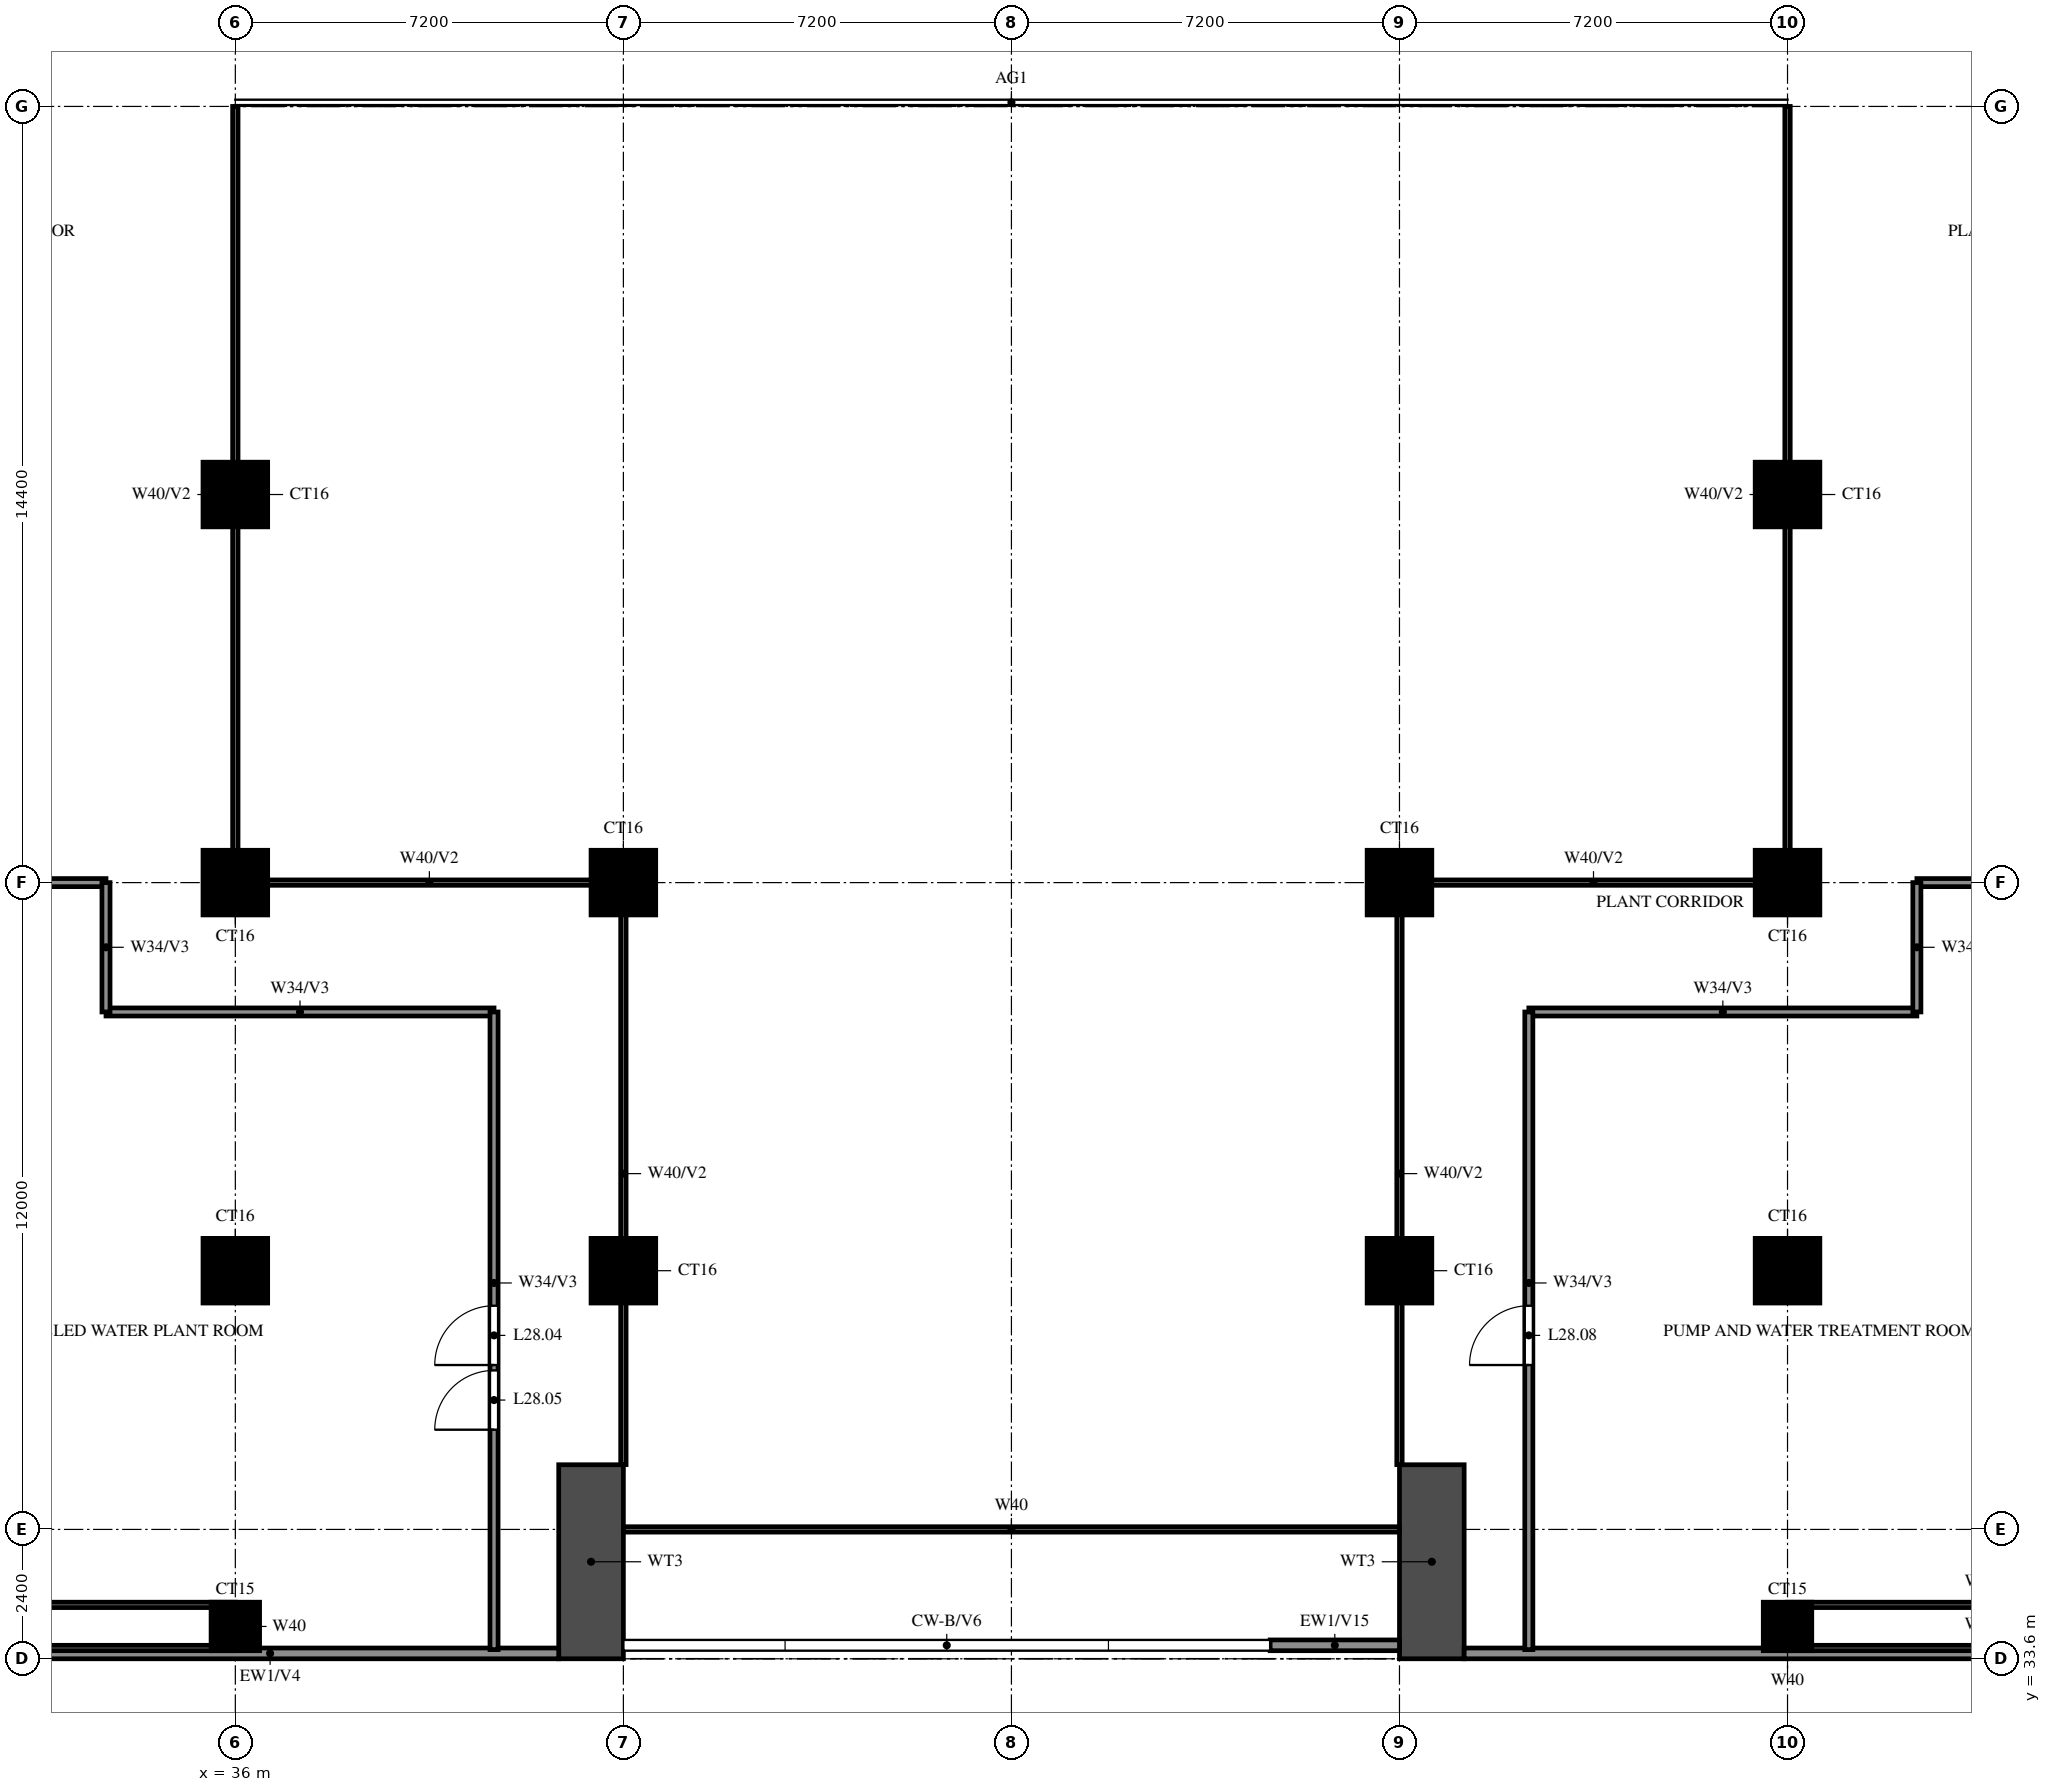
"""IFC4 building model, lengths in metres.
Left out: names, types, materials, properties, quantities, classifications, styles, units other than length and angle.
Written with IfcOpenShell. Run it as: python <this file> out.ifc"""

import sys

from ifc_helpers import new_model, si_unit, direction, frame, frame_2d, origin, origin_2d, place, context, subcontext, project, spatial, rectangle, extrude, source, transform, mapped, element, fill, save


model = new_model("IFC4")
c1 = context("Model", 3, precision=1e-05, world=origin(), true_north=direction((0.0, 1.0)))
c2 = subcontext(c1, "Body", "Model", "MODEL_VIEW")
j1 = project(units=[si_unit("LENGTHUNIT", "METRE"), si_unit("PLANEANGLEUNIT", "RADIAN")], contexts=[c1])
p1 = place(None, origin())
s1 = spatial("IfcSite", under=j1, at=p1, CompositionType="ELEMENT")
p2 = place(p1, origin())
s2 = spatial("IfcBuilding", under=s1, at=p2, CompositionType="ELEMENT")
p3 = place(p2, frame((0.0, 0.0, 107.5)))
s3 = spatial("IfcBuildingStorey", under=s2, at=p3, CompositionType="ELEMENT", Elevation=107.5)
m1 = source(origin(), c2, "Body", "SweptSolid", [
    extrude(rectangle(XDim=0.9, YDim=0.9, at=origin_2d()), origin(), (0.0, 0.0, 1.0), 5.2),
])
for number, where, z_axis, x_axis in (
    (1, (36.0, 34.2, 0.0), (0.0, 0.0, 1.0), (1.0, 0.0, 0.0)),
    (2, (64.8, 34.2, 0.0), (0.0, 0.0, 1.0), (1.0, 0.0, 0.0)),
):
    element("IfcColumn", number, at=place(p3, frame(where, z_axis=z_axis, x_axis=x_axis)), inside=s3, PredefinedType="COLUMN", context=c2, shape_type="MappedRepresentation", body=[
        mapped(m1, transform((0.0, 0.0, 0.0))),
    ])
m2 = source(origin(), c2, "Body", "SweptSolid", [
    extrude(rectangle(XDim=1.2, YDim=1.2, at=origin_2d()), origin(), (0.0, 0.0, 1.0), 5.2),
])
for number, where, z_axis, x_axis in (
    (3, (36.0, 40.8, 0.0), (0.0, 0.0, 1.0), (1.0, 0.0, 0.0)),
    (4, (43.2, 40.8, 0.0), (0.0, 0.0, 1.0), (1.0, 0.0, 0.0)),
    (5, (57.6, 40.8, 0.0), (0.0, 0.0, 1.0), (1.0, 0.0, 0.0)),
    (6, (64.8, 40.8, 0.0), (0.0, 0.0, 1.0), (1.0, 0.0, 0.0)),
    (7, (36.0, 48.0, 0.0), (0.0, 0.0, 1.0), (1.0, 0.0, 0.0)),
    (8, (43.2, 48.0, 0.0), (0.0, 0.0, 1.0), (1.0, 0.0, 0.0)),
    (9, (57.6, 48.0, 0.0), (0.0, 0.0, 1.0), (1.0, 0.0, 0.0)),
    (10, (64.8, 48.0, 0.0), (0.0, 0.0, 1.0), (1.0, 0.0, 0.0)),
    (11, (36.0, 55.2, 0.0), (0.0, 0.0, 1.0), (1.0, 0.0, 0.0)),
    (12, (64.8, 55.2, 0.0), (0.0, 0.0, 1.0), (1.0, 0.0, 0.0)),
):
    element("IfcColumn", number, at=place(p3, frame(where, z_axis=z_axis, x_axis=x_axis)), inside=s3, PredefinedType="COLUMN", context=c2, shape_type="MappedRepresentation", body=[
        mapped(m2, transform((0.0, 0.0, 0.0))),
    ])
for number, where, z_axis, x_axis in (
    (13, (42.6, 33.6, 0.0), (0.0, 0.0, 1.0), (0.0, 1.0, 0.0)),
    (14, (58.2, 33.6, 0.0), (0.0, 0.0, 1.0), (0.0, 1.0, 0.0)),
):
    element("IfcWall", number, at=place(p3, frame(where, z_axis=z_axis, x_axis=x_axis)), inside=s3, PredefinedType="SHEAR", context=c2, shape_type="SweptSolid", body=[
        extrude(rectangle(XDim=3.6, YDim=1.2, at=frame_2d((1.8, 0.0))), origin(), (0.0, 0.0, 1.0), 5.2),
    ])
p4 = place(p3, frame((18.2, 33.7, 0.0), z_axis=(0.0, 0.0, 1.0), x_axis=(1.0, 0.0, 0.0)))
e15 = element("IfcWall", 15, at=p4, inside=s3, PredefinedType="SOLIDWALL", context=c2, shape_type="SweptSolid", body=[
    extrude(rectangle(XDim=23.8, YDim=0.2, at=frame_2d((11.9, 0.0))), origin(), (0.0, 0.0, 1.0), 5.2),
])
p5 = place(p3, frame((58.8, 33.7, 0.0), z_axis=(0.0, 0.0, 1.0), x_axis=(1.0, 0.0, 0.0)))
e16 = element("IfcWall", 16, at=p5, inside=s3, PredefinedType="SOLIDWALL", context=c2, shape_type="SweptSolid", body=[
    extrude(rectangle(XDim=27.359, YDim=0.2, at=frame_2d((13.679, 0.0))), origin(), (0.0, 0.0, 1.0), 5.2),
])
p6 = place(p3, frame((55.2, 33.85, 0.0), z_axis=(0.0, 0.0, 1.0), x_axis=(1.0, 0.0, 0.0)))
e17 = element("IfcWall", 17, at=p6, inside=s3, PredefinedType="SOLIDWALL", context=c2, shape_type="SweptSolid", body=[
    extrude(rectangle(XDim=2.4, YDim=0.2, at=frame_2d((1.2, 0.0))), origin(), (0.0, 0.0, 1.0), 4.0),
])
p7 = place(p3, frame((21.6, 33.8, 0.0), z_axis=(0.0, 0.0, 1.0), x_axis=(1.0, 0.0, 0.0)))
e18 = element("IfcWall", 18, at=p7, inside=s3, PredefinedType="PARTITIONING", context=c2, shape_type="SweptSolid", body=[
    extrude(rectangle(XDim=14.4, YDim=0.1, at=frame_2d((7.2, 0.0))), origin(), (0.0, 0.0, 1.0), 5.2),
])
p8 = place(p3, frame((64.8, 33.8, 0.0), z_axis=(0.0, 0.0, 1.0), x_axis=(1.0, 0.0, 0.0)))
e19 = element("IfcWall", 19, at=p8, inside=s3, PredefinedType="PARTITIONING", context=c2, shape_type="SweptSolid", body=[
    extrude(rectangle(XDim=7.2, YDim=0.1, at=frame_2d((3.6, 0.0))), origin(), (0.0, 0.0, 1.0), 5.2),
])
p9 = place(p3, frame((21.6, 34.6, 0.0), z_axis=(0.0, 0.0, 1.0), x_axis=(1.0, 0.0, 0.0)))
e20 = element("IfcWall", 20, at=p9, inside=s3, PredefinedType="PARTITIONING", context=c2, shape_type="SweptSolid", body=[
    extrude(rectangle(XDim=14.4, YDim=0.1, at=frame_2d((7.2, 0.0))), origin(), (0.0, 0.0, 1.0), 5.2),
])
p10 = place(p3, frame((64.8, 34.6, 0.0), z_axis=(0.0, 0.0, 1.0), x_axis=(1.0, 0.0, 0.0)))
e21 = element("IfcWall", 21, at=p10, inside=s3, PredefinedType="PARTITIONING", context=c2, shape_type="SweptSolid", body=[
    extrude(rectangle(XDim=7.2, YDim=0.1, at=frame_2d((3.6, 0.0))), origin(), (0.0, 0.0, 1.0), 5.2),
])
p11 = place(p3, frame((43.202, 36.0, 0.0), z_axis=(0.0, 0.0, 1.0), x_axis=(1.0, 0.0, 0.0)))
e22 = element("IfcWall", 22, at=p11, inside=s3, PredefinedType="PARTITIONING", context=c2, shape_type="SweptSolid", body=[
    extrude(rectangle(XDim=14.396, YDim=0.1, at=frame_2d((7.198, 0.0))), origin(), (0.0, 0.0, 1.0), 5.2),
])
for number, where, z_axis, x_axis in (
    (23, (33.6, 45.6, 0.0), (0.0, 0.0, 1.0), (1.0, 0.0, 0.0)),
    (24, (60.0, 45.6, 0.0), (0.0, 0.0, 1.0), (1.0, 0.0, 0.0)),
):
    element("IfcWall", number, at=place(p3, frame(where, z_axis=z_axis, x_axis=x_axis)), inside=s3, PredefinedType="PARTITIONING", context=c2, shape_type="SweptSolid", body=[
        extrude(rectangle(XDim=7.2, YDim=0.15, at=frame_2d((3.6, 0.0))), origin(), (0.0, 0.0, 1.0), 4.3),
    ])
for number, where, z_axis, x_axis in (
    (25, (36.0, 48.0, 0.0), (0.0, 0.0, 1.0), (1.0, 0.0, 0.0)),
    (26, (57.6, 48.0, 0.0), (0.0, 0.0, 1.0), (1.0, 0.0, 0.0)),
):
    element("IfcWall", number, at=place(p3, frame(where, z_axis=z_axis, x_axis=x_axis)), inside=s3, PredefinedType="PARTITIONING", context=c2, shape_type="SweptSolid", body=[
        extrude(rectangle(XDim=7.2, YDim=0.1, at=frame_2d((3.6, 0.0))), origin(), (0.0, 0.0, 1.0), 4.3),
    ])
p12 = place(p3, frame((15.45, 48.0, 0.0), z_axis=(0.0, 0.0, 1.0), x_axis=(1.0, 0.0, 0.0)))
e27 = element("IfcWall", 27, at=p12, inside=s3, PredefinedType="PARTITIONING", context=c2, shape_type="SweptSolid", body=[
    extrude(rectangle(XDim=18.15, YDim=0.15, at=frame_2d((9.075, 0.0))), origin(), (0.0, 0.0, 1.0), 4.3),
])
p13 = place(p3, frame((67.2, 48.0, 0.0), z_axis=(0.0, 0.0, 1.0), x_axis=(1.0, 0.0, 0.0)))
e28 = element("IfcWall", 28, at=p13, inside=s3, PredefinedType="PARTITIONING", context=c2, shape_type="SweptSolid", body=[
    extrude(rectangle(XDim=4.63, YDim=0.15, at=frame_2d((2.315, 0.0))), origin(), (0.0, 0.0, 1.0), 5.2),
])
p14 = place(p3, frame((33.6, 45.6, 0.0), z_axis=(0.0, 0.0, 1.0), x_axis=(0.0, 1.0, 0.0)))
e29 = element("IfcWall", 29, at=p14, inside=s3, PredefinedType="PARTITIONING", context=c2, shape_type="SweptSolid", body=[
    extrude(rectangle(XDim=2.4, YDim=0.15, at=frame_2d((1.2, 0.0))), origin(), (0.0, 0.0, 1.0), 4.3),
])
p15 = place(p3, frame((36.0, 33.8, 0.0), z_axis=(0.0, 0.0, 1.0), x_axis=(0.0, 1.0, 0.0)))
e30 = element("IfcWall", 30, at=p15, inside=s3, PredefinedType="PARTITIONING", context=c2, shape_type="SweptSolid", body=[
    extrude(rectangle(XDim=0.8, YDim=0.1, at=frame_2d((0.4, 0.0))), origin(), (0.0, 0.0, 1.0), 5.2),
])
p16 = place(p3, frame((36.0, 48.0, 0.0), z_axis=(0.0, 0.0, 1.0), x_axis=(0.0, 1.0, 0.0)))
e31 = element("IfcWall", 31, at=p16, inside=s3, PredefinedType="PARTITIONING", context=c2, shape_type="SweptSolid", body=[
    extrude(rectangle(XDim=14.4, YDim=0.1, at=frame_2d((7.2, 0.0))), origin(), (0.0, 0.0, 1.0), 4.3),
])
p17 = place(p3, frame((40.8, 33.77, 0.0), z_axis=(0.0, 0.0, 1.0), x_axis=(0.0, 1.0, 0.0)))
e32 = element("IfcWall", 32, at=p17, inside=s3, PredefinedType="PARTITIONING", context=c2, shape_type="SweptSolid", body=[
    extrude(rectangle(XDim=11.83, YDim=0.15, at=frame_2d((5.915, 0.0))), origin(), (0.0, 0.0, 1.0), 4.3),
])
p18 = place(p17, frame((5.28, 0.0, 0.0)))
e33 = element("IfcOpeningElement", 33, at=p18, cuts=e32, PredefinedType="OPENING", context=c2, shape_type="SweptSolid", body=[
    extrude(rectangle(XDim=1.1, YDim=2.1, at=frame_2d((0.55, 1.05))), frame((0.0, 0.085, 0.0), z_axis=(0.0, -1.0, 0.0), x_axis=(1.0, 0.0, 0.0)), (0.0, 0.0, 1.0), 0.17),
])
p19 = place(p17, frame((4.08, 0.0, 0.0)))
e34 = element("IfcOpeningElement", 34, at=p19, cuts=e32, PredefinedType="OPENING", context=c2, shape_type="SweptSolid", body=[
    extrude(rectangle(XDim=1.1, YDim=2.1, at=frame_2d((0.55, 1.05))), frame((0.0, 0.085, 0.0), z_axis=(0.0, -1.0, 0.0), x_axis=(1.0, 0.0, 0.0)), (0.0, 0.0, 1.0), 0.17),
])
for number, where, z_axis, x_axis in (
    (35, (43.2, 37.202, 0.0), (0.0, 0.0, 1.0), (0.0, 1.0, 0.0)),
    (36, (57.6, 37.202, 0.0), (0.0, 0.0, 1.0), (0.0, 1.0, 0.0)),
):
    element("IfcWall", number, at=place(p3, frame(where, z_axis=z_axis, x_axis=x_axis)), inside=s3, PredefinedType="PARTITIONING", context=c2, shape_type="SweptSolid", body=[
        extrude(rectangle(XDim=10.798, YDim=0.1, at=frame_2d((5.399, 0.0))), origin(), (0.0, 0.0, 1.0), 4.3),
    ])
p20 = place(p3, frame((60.0, 33.77, 0.0), z_axis=(0.0, 0.0, 1.0), x_axis=(0.0, 1.0, 0.0)))
e37 = element("IfcWall", 37, at=p20, inside=s3, PredefinedType="PARTITIONING", context=c2, shape_type="SweptSolid", body=[
    extrude(rectangle(XDim=11.83, YDim=0.15, at=frame_2d((5.915, 0.0))), origin(), (0.0, 0.0, 1.0), 4.3),
])
p21 = place(p20, frame((5.28, 0.0, 0.0)))
e38 = element("IfcOpeningElement", 38, at=p21, cuts=e37, PredefinedType="OPENING", context=c2, shape_type="SweptSolid", body=[
    extrude(rectangle(XDim=1.1, YDim=2.1, at=frame_2d((0.55, 1.05))), frame((0.0, 0.085, 0.0), z_axis=(0.0, -1.0, 0.0), x_axis=(1.0, 0.0, 0.0)), (0.0, 0.0, 1.0), 0.17),
])
p22 = place(p3, frame((64.8, 33.8, 0.0), z_axis=(0.0, 0.0, 1.0), x_axis=(0.0, 1.0, 0.0)))
e39 = element("IfcWall", 39, at=p22, inside=s3, PredefinedType="PARTITIONING", context=c2, shape_type="SweptSolid", body=[
    extrude(rectangle(XDim=0.8, YDim=0.1, at=frame_2d((0.4, 0.0))), origin(), (0.0, 0.0, 1.0), 5.2),
])
p23 = place(p3, frame((64.8, 48.0, 0.0), z_axis=(0.0, 0.0, 1.0), x_axis=(0.0, 1.0, 0.0)))
e40 = element("IfcWall", 40, at=p23, inside=s3, PredefinedType="PARTITIONING", context=c2, shape_type="SweptSolid", body=[
    extrude(rectangle(XDim=14.4, YDim=0.1, at=frame_2d((7.2, 0.0))), origin(), (0.0, 0.0, 1.0), 4.3),
])
p24 = place(p3, frame((67.2, 45.6, 0.0), z_axis=(0.0, 0.0, 1.0), x_axis=(0.0, 1.0, 0.0)))
e41 = element("IfcWall", 41, at=p24, inside=s3, PredefinedType="PARTITIONING", context=c2, shape_type="SweptSolid", body=[
    extrude(rectangle(XDim=2.4, YDim=0.15, at=frame_2d((1.2, 0.0))), origin(), (0.0, 0.0, 1.0), 5.2),
])
p25 = place(p18, origin())
e42 = element("IfcDoor", 42, at=p25, inside=s3, OperationType="SINGLE_SWING_LEFT", PredefinedType="DOOR", context=c2, shape_type="SweptSolid", body=[
    extrude(rectangle(XDim=1.1, YDim=2.1, at=frame_2d((0.55, 1.05))), frame((0.0, 0.025, 0.0), z_axis=(0.0, -1.0, 0.0), x_axis=(1.0, 0.0, 0.0)), (0.0, 0.0, 1.0), 0.05),
])
fill(e33, e42)
p26 = place(p19, origin())
e43 = element("IfcDoor", 43, at=p26, inside=s3, OperationType="SINGLE_SWING_LEFT", PredefinedType="DOOR", context=c2, shape_type="SweptSolid", body=[
    extrude(rectangle(XDim=1.1, YDim=2.1, at=frame_2d((0.55, 1.05))), frame((0.0, 0.025, 0.0), z_axis=(0.0, -1.0, 0.0), x_axis=(1.0, 0.0, 0.0)), (0.0, 0.0, 1.0), 0.05),
])
fill(e34, e43)
p27 = place(p21, origin())
e44 = element("IfcDoor", 44, at=p27, inside=s3, OperationType="SINGLE_SWING_LEFT", PredefinedType="DOOR", context=c2, shape_type="SweptSolid", body=[
    extrude(rectangle(XDim=1.1, YDim=2.1, at=frame_2d((0.55, 1.05))), frame((0.0, 0.025, 0.0), z_axis=(0.0, -1.0, 0.0), x_axis=(1.0, 0.0, 0.0)), (0.0, 0.0, 1.0), 0.05),
])
fill(e38, e44)
save(model, sys.argv[1])
